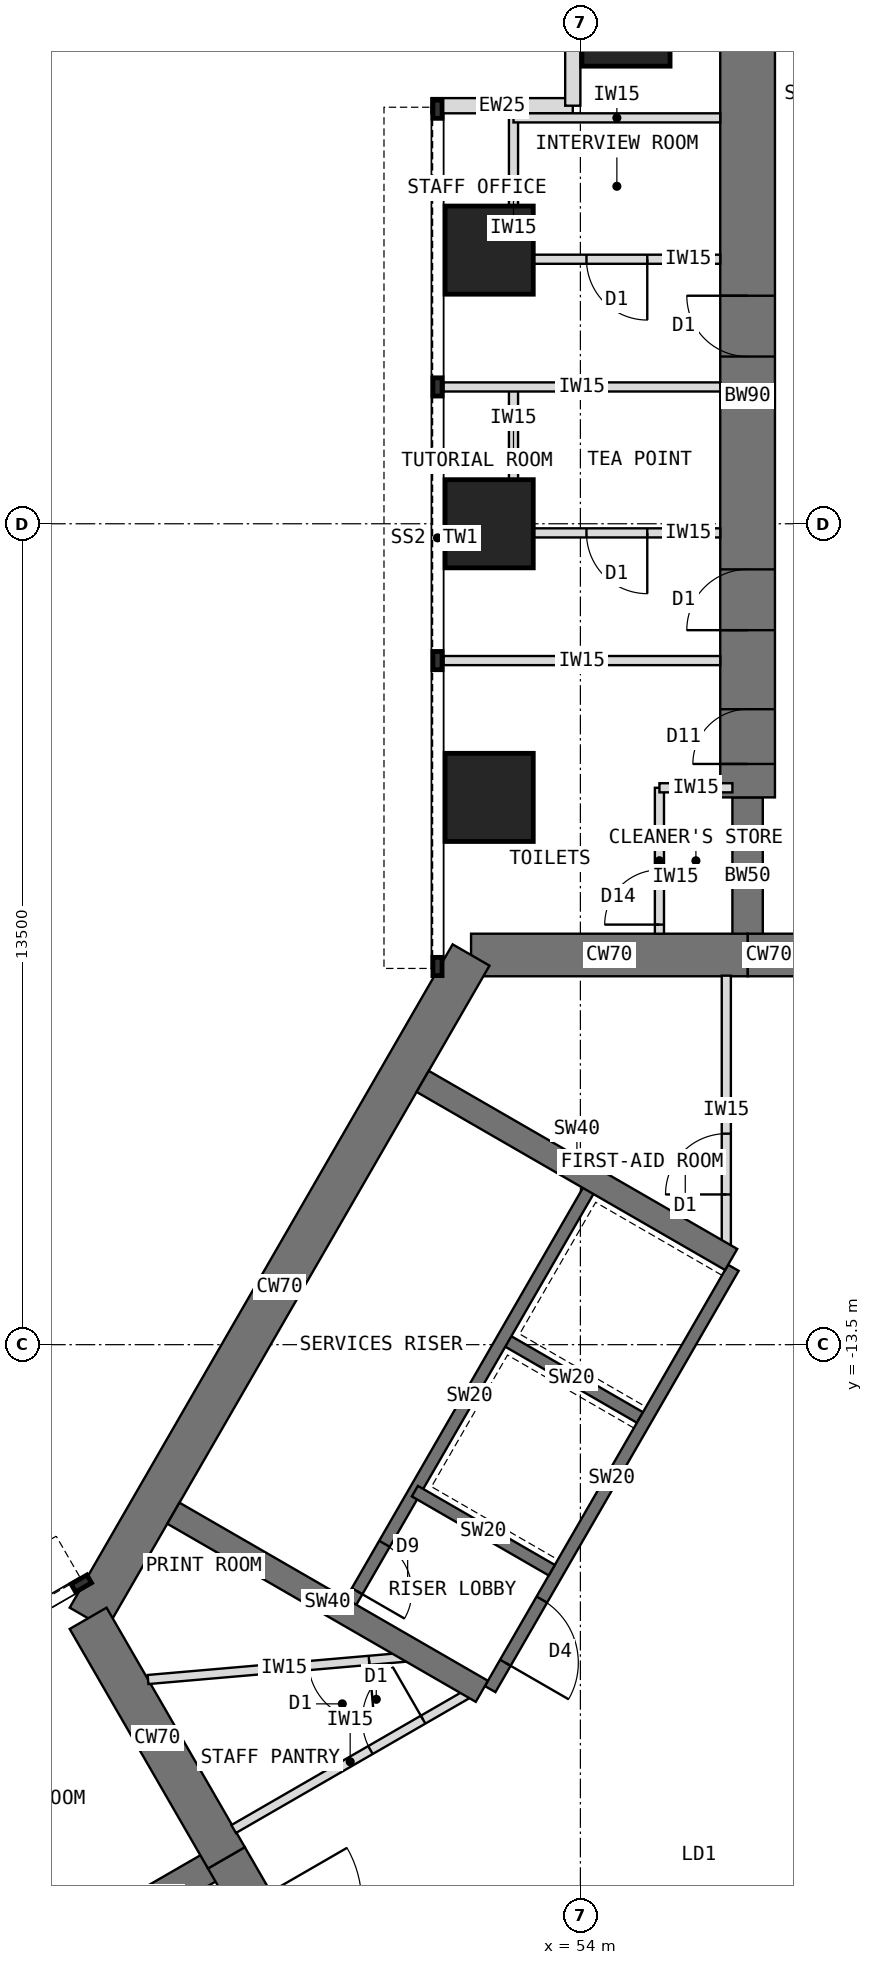
"""IFC4 building model, lengths in metres.
Left out: names, types, materials, properties, quantities, classifications, styles, units other than length and angle.
Written with IfcOpenShell. Run it as: python <this file> out.ifc"""

import sys

from ifc_helpers import new_model, si_unit, direction, frame, frame_2d, origin, origin_2d, place, context, subcontext, project, spatial, rectangle, extrude, element, fill, save


model = new_model("IFC4")
c1 = context("Model", 3, precision=1e-05, world=origin(), true_north=direction((0.0, 1.0)))
c2 = subcontext(c1, "Body", "Model", "MODEL_VIEW")
j1 = project(units=[si_unit("LENGTHUNIT", "METRE"), si_unit("PLANEANGLEUNIT", "RADIAN")], contexts=[c1])
p1 = place(None, origin())
s1 = spatial("IfcSite", under=j1, at=p1, CompositionType="ELEMENT")
p2 = place(p1, origin())
s2 = spatial("IfcBuilding", under=s1, at=p2, CompositionType="ELEMENT")
p3 = place(p2, frame((0.0, 0.0, 60.5)))
s3 = spatial("IfcBuildingStorey", under=s2, at=p3, CompositionType="ELEMENT", Elevation=60.5)
p4 = place(p3, frame((60.25, -7.092, 0.0), z_axis=(0.0, 0.0, 1.0), x_axis=(-1.0, 0.0, 0.0)))
e1 = element("IfcWall", 1, at=p4, inside=s3, PredefinedType="SHEAR", context=c2, shape_type="SweptSolid", body=[
    extrude(rectangle(XDim=3.5, YDim=0.7, at=frame_2d((1.75, 0.0))), origin(), (0.0, 0.0, 1.0), 4.0),
])
p5 = place(p4, frame((0.85, 0.0, 0.0)))
e2 = element("IfcOpeningElement", 2, at=p5, cuts=e1, PredefinedType="OPENING", context=c2, shape_type="SweptSolid", body=[
    extrude(rectangle(XDim=1.8, YDim=2.1, at=frame_2d((0.9, 1.05))), frame((0.0, 0.36, 0.0), z_axis=(0.0, -1.0, 0.0), x_axis=(1.0, 0.0, 0.0)), (0.0, 0.0, 1.0), 0.72),
])
p6 = place(p3, frame((56.75, -7.092, 0.0), z_axis=(0.0, 0.0, 1.0), x_axis=(-1.0, 0.0, 0.0)))
e3 = element("IfcWall", 3, at=p6, inside=s3, PredefinedType="SHEAR", context=c2, shape_type="SweptSolid", body=[
    extrude(rectangle(XDim=4.548, YDim=0.7, at=frame_2d((2.274, 0.0))), origin(), (0.0, 0.0, 1.0), 4.0),
])
p7 = place(p3, frame((52.202, -7.092, 0.0), z_axis=(0.0, 0.0, 1.0), x_axis=(-0.500005998175, -0.866021940709, 0.0)))
e4 = element("IfcWall", 4, at=p7, inside=s3, PredefinedType="SHEAR", context=c2, shape_type="SweptSolid", body=[
    extrude(rectangle(XDim=12.596, YDim=0.7, at=frame_2d((6.298, 0.0))), origin(), (0.0, 0.0, 1.0), 4.0),
])
p8 = place(p3, frame((45.904, -18.0, 0.0), z_axis=(0.0, 0.0, 1.0), x_axis=(0.500024481964, -0.866011268655, 0.0)))
e5 = element("IfcWall", 5, at=p8, inside=s3, PredefinedType="SHEAR", context=c2, shape_type="SweptSolid", body=[
    extrude(rectangle(XDim=4.548, YDim=0.7, at=frame_2d((2.274, 0.0))), origin(), (0.0, 0.0, 1.0), 4.0),
])
p9 = place(p3, frame((48.178, -21.939, 0.0), z_axis=(0.0, 0.0, 1.0), x_axis=(0.500010275428, -0.866019471182, 0.0)))
e6 = element("IfcWall", 6, at=p9, inside=s3, PredefinedType="SHEAR", context=c2, shape_type="SweptSolid", body=[
    extrude(rectangle(XDim=3.5, YDim=0.7, at=frame_2d((1.75, 0.0))), origin(), (0.0, 0.0, 1.0), 4.0),
])
p10 = place(p9, frame((0.85, 0.0, 0.0)))
e7 = element("IfcOpeningElement", 7, at=p10, cuts=e6, PredefinedType="OPENING", context=c2, shape_type="SweptSolid", body=[
    extrude(rectangle(XDim=1.8, YDim=2.1, at=frame_2d((0.9, 1.05))), frame((0.0, 0.36, 0.0), z_axis=(0.0, -1.0, 0.0), x_axis=(1.0, 0.0, 0.0)), (0.0, 0.0, 1.0), 0.72),
])
p11 = place(p3, frame((56.75, -7.092, 0.0), z_axis=(0.0, 0.0, 1.0), x_axis=(0.0, 1.0, 0.0)))
e8 = element("IfcWall", 8, at=p11, inside=s3, PredefinedType="SHEAR", context=c2, shape_type="SweptSolid", body=[
    extrude(rectangle(XDim=2.592, YDim=0.5, at=frame_2d((1.296, 0.0))), origin(), (0.0, 0.0, 1.0), 4.0),
])
p12 = place(p3, frame((56.75, -4.5, 0.0), z_axis=(0.0, 0.0, 1.0), x_axis=(0.0, 1.0, 0.0)))
e9 = element("IfcWall", 9, at=p12, inside=s3, PredefinedType="SHEAR", context=c2, shape_type="SweptSolid", body=[
    extrude(rectangle(XDim=13.2, YDim=0.9, at=frame_2d((6.6, 0.0))), origin(), (0.0, 0.0, 1.0), 4.0),
])
p13 = place(p12, frame((0.55, 0.0, 0.0)))
e10 = element("IfcOpeningElement", 10, at=p13, cuts=e9, PredefinedType="OPENING", context=c2, shape_type="SweptSolid", body=[
    extrude(rectangle(XDim=0.9, YDim=2.1, at=frame_2d((0.45, 1.05))), frame((0.0, 0.46, 0.0), z_axis=(0.0, -1.0, 0.0), x_axis=(1.0, 0.0, 0.0)), (0.0, 0.0, 1.0), 0.92),
])
p14 = place(p12, frame((2.75, 0.0, 0.0)))
e11 = element("IfcOpeningElement", 11, at=p14, cuts=e9, PredefinedType="OPENING", context=c2, shape_type="SweptSolid", body=[
    extrude(rectangle(XDim=1.0, YDim=2.1, at=frame_2d((0.5, 1.05))), frame((0.0, 0.46, 0.0), z_axis=(0.0, -1.0, 0.0), x_axis=(1.0, 0.0, 0.0)), (0.0, 0.0, 1.0), 0.92),
])
p15 = place(p12, frame((7.25, 0.0, 0.0)))
e12 = element("IfcOpeningElement", 12, at=p15, cuts=e9, PredefinedType="OPENING", context=c2, shape_type="SweptSolid", body=[
    extrude(rectangle(XDim=1.0, YDim=2.1, at=frame_2d((0.5, 1.05))), frame((0.0, 0.46, 0.0), z_axis=(0.0, -1.0, 0.0), x_axis=(1.0, 0.0, 0.0)), (0.0, 0.0, 1.0), 0.92),
])
p16 = place(p3, frame((48.178, -21.939, 0.0), z_axis=(0.0, 0.0, 1.0), x_axis=(-0.866072649678, -0.499918158782, 0.0)))
e13 = element("IfcWall", 13, at=p16, inside=s3, PredefinedType="SHEAR", context=c2, shape_type="SweptSolid", body=[
    extrude(rectangle(XDim=2.592, YDim=0.5, at=frame_2d((1.296, 0.0))), origin(), (0.0, 0.0, 1.0), 4.0),
])
for number, where, z_axis, x_axis in (
    (14, (52.5, -4.5, 0.0), (0.0, 0.0, 1.0), (1.0, 0.0, 0.0)),
    (15, (52.5, 0.0, 0.0), (0.0, 0.0, 1.0), (1.0, 0.0, 0.0)),
    (16, (52.5, 4.5, 0.0), (0.0, 0.0, 1.0), (1.0, 0.0, 0.0)),
    (17, (54.75, 8.25, 0.0), (0.0, 0.0, 1.0), (1.0, 0.0, 0.0)),
):
    element("IfcColumn", number, at=place(p3, frame(where, z_axis=z_axis, x_axis=x_axis)), inside=s3, PredefinedType="COLUMN", context=c2, shape_type="SweptSolid", body=[
        extrude(rectangle(XDim=1.45, YDim=1.45, at=origin_2d()), origin(), (0.0, 0.0, 1.0), 4.0),
    ])
for number, where, z_axis, x_axis in (
    (18, (51.55, 6.875, 0.0), (0.0, 0.0, 1.0), (1.0, 0.0, 0.0)),
    (19, (53.875, 6.875, 0.0), (0.0, 0.0, 1.0), (0.0, 1.0, 0.0)),
):
    element("IfcWall", number, at=place(p3, frame(where, z_axis=z_axis, x_axis=x_axis)), inside=s3, PredefinedType="STANDARD", context=c2, shape_type="SweptSolid", body=[
        extrude(rectangle(XDim=2.325, YDim=0.25, at=frame_2d((1.163, 0.0))), origin(), (0.0, 0.0, 1.0), 3.8),
    ])
p17 = place(p3, frame((56.516, -12.236, 0.0), z_axis=(0.0, 0.0, 1.0), x_axis=(-0.49999894854, -0.866026010844, 0.0)))
e20 = element("IfcWall", 20, at=p17, inside=s3, PredefinedType="SHEAR", context=c2, shape_type="SweptSolid", body=[
    extrude(rectangle(XDim=8.0, YDim=0.2, at=frame_2d((4.0, 0.0))), origin(), (0.0, 0.0, 1.0), 4.0),
])
p18 = place(p17, frame((6.3, 0.0, 0.0)))
e21 = element("IfcOpeningElement", 21, at=p18, cuts=e20, PredefinedType="OPENING", context=c2, shape_type="SweptSolid", body=[
    extrude(rectangle(XDim=1.2, YDim=2.1, at=frame_2d((0.6, 1.05))), frame((0.0, 0.11, 0.0), z_axis=(0.0, -1.0, 0.0), x_axis=(1.0, 0.0, 0.0)), (0.0, 0.0, 1.0), 0.22),
])
for number, where, z_axis, x_axis in (
    (22, (54.98, -14.697, 0.0), (0.0, 0.0, 1.0), (-0.866, 0.5, 0.0)),
    (23, (53.53, -17.209, 0.0), (0.0, 0.0, 1.0), (-0.866, 0.5, 0.0)),
):
    element("IfcWall", number, at=place(p3, frame(where, z_axis=z_axis, x_axis=x_axis)), inside=s3, PredefinedType="SHEAR", context=c2, shape_type="SweptSolid", body=[
        extrude(rectangle(XDim=2.6, YDim=0.2, at=frame_2d((1.3, 0.0))), origin(), (0.0, 0.0, 1.0), 4.0),
    ])
p19 = place(p3, frame((54.178, -10.886, 0.0), z_axis=(0.0, 0.0, 1.0), x_axis=(-0.49999894854, -0.866026010844, 0.0)))
e24 = element("IfcWall", 24, at=p19, inside=s3, PredefinedType="SHEAR", context=c2, shape_type="SweptSolid", body=[
    extrude(rectangle(XDim=8.0, YDim=0.2, at=frame_2d((4.0, 0.0))), origin(), (0.0, 0.0, 1.0), 4.0),
])
p20 = place(p19, frame((6.8, 0.0, 0.0)))
e25 = element("IfcOpeningElement", 25, at=p20, cuts=e24, PredefinedType="OPENING", context=c2, shape_type="SweptSolid", body=[
    extrude(rectangle(XDim=0.9, YDim=2.1, at=frame_2d((0.45, 1.05))), frame((0.0, 0.11, 0.0), z_axis=(0.0, -1.0, 0.0), x_axis=(1.0, 0.0, 0.0)), (0.0, 0.0, 1.0), 0.22),
])
for number, where, z_axis, x_axis in (
    (26, (52.38, -19.201, 0.0), (0.0, 0.0, 1.0), (-0.866, 0.5, 0.0)),
    (27, (56.48, -12.099, 0.0), (0.0, 0.0, 1.0), (-0.866, 0.5, 0.0)),
):
    element("IfcWall", number, at=place(p3, frame(where, z_axis=z_axis, x_axis=x_axis)), inside=s3, PredefinedType="SHEAR", context=c2, shape_type="SweptSolid", body=[
        extrude(rectangle(XDim=5.858, YDim=0.4, at=frame_2d((2.929, 0.0))), origin(), (0.0, 0.0, 1.0), 4.0),
    ])
for number, where, z_axis, x_axis in (
    (28, (56.3, -2.25, 0.0), (0.0, 0.0, 1.0), (-1.0, 0.0, 0.0)),
    (29, (56.3, 2.25, 0.0), (0.0, 0.0, 1.0), (-1.0, 0.0, 0.0)),
):
    element("IfcWall", number, at=place(p3, frame(where, z_axis=z_axis, x_axis=x_axis)), inside=s3, PredefinedType="PARTITIONING", context=c2, shape_type="SweptSolid", body=[
        extrude(rectangle(XDim=4.55, YDim=0.15, at=frame_2d((2.275, 0.0))), origin(), (0.0, 0.0, 1.0), 3.8),
    ])
p21 = place(p3, frame((52.9, -0.15, 0.0), z_axis=(0.0, 0.0, 1.0), x_axis=(0.0, 1.0, 0.0)))
e30 = element("IfcWall", 30, at=p21, inside=s3, PredefinedType="PARTITIONING", context=c2, shape_type="SweptSolid", body=[
    extrude(rectangle(XDim=2.4, YDim=0.15, at=frame_2d((1.2, 0.0))), origin(), (0.0, 0.0, 1.0), 3.8),
])
p22 = place(p3, frame((56.3, -0.15, 0.0), z_axis=(0.0, 0.0, 1.0), x_axis=(-1.0, 0.0, 0.0)))
e31 = element("IfcWall", 31, at=p22, inside=s3, PredefinedType="PARTITIONING", context=c2, shape_type="SweptSolid", body=[
    extrude(rectangle(XDim=3.4, YDim=0.15, at=frame_2d((1.7, 0.0))), origin(), (0.0, 0.0, 1.0), 3.8),
])
p23 = place(p22, frame((1.2, 0.0, 0.0)))
e32 = element("IfcOpeningElement", 32, at=p23, cuts=e31, PredefinedType="OPENING", context=c2, shape_type="SweptSolid", body=[
    extrude(rectangle(XDim=1.0, YDim=2.1, at=frame_2d((0.5, 1.05))), frame((0.0, 0.085, 0.0), z_axis=(0.0, -1.0, 0.0), x_axis=(1.0, 0.0, 0.0)), (0.0, 0.0, 1.0), 0.17),
])
p24 = place(p3, frame((52.9, 4.35, 0.0), z_axis=(0.0, 0.0, 1.0), x_axis=(0.0, 1.0, 0.0)))
e33 = element("IfcWall", 33, at=p24, inside=s3, PredefinedType="PARTITIONING", context=c2, shape_type="SweptSolid", body=[
    extrude(rectangle(XDim=2.4, YDim=0.15, at=frame_2d((1.2, 0.0))), origin(), (0.0, 0.0, 1.0), 3.8),
])
p25 = place(p3, frame((56.3, 4.35, 0.0), z_axis=(0.0, 0.0, 1.0), x_axis=(-1.0, 0.0, 0.0)))
e34 = element("IfcWall", 34, at=p25, inside=s3, PredefinedType="PARTITIONING", context=c2, shape_type="SweptSolid", body=[
    extrude(rectangle(XDim=3.4, YDim=0.15, at=frame_2d((1.7, 0.0))), origin(), (0.0, 0.0, 1.0), 3.8),
])
p26 = place(p25, frame((1.2, 0.0, 0.0)))
e35 = element("IfcOpeningElement", 35, at=p26, cuts=e34, PredefinedType="OPENING", context=c2, shape_type="SweptSolid", body=[
    extrude(rectangle(XDim=1.0, YDim=2.1, at=frame_2d((0.5, 1.05))), frame((0.0, 0.085, 0.0), z_axis=(0.0, -1.0, 0.0), x_axis=(1.0, 0.0, 0.0)), (0.0, 0.0, 1.0), 0.17),
])
p27 = place(p3, frame((56.3, 6.675, 0.0), z_axis=(0.0, 0.0, 1.0), x_axis=(-1.0, 0.0, 0.0)))
e36 = element("IfcWall", 36, at=p27, inside=s3, PredefinedType="PARTITIONING", context=c2, shape_type="SweptSolid", body=[
    extrude(rectangle(XDim=3.4, YDim=0.15, at=frame_2d((1.7, 0.0))), origin(), (0.0, 0.0, 1.0), 3.8),
])
p28 = place(p3, frame((55.3, -6.742, 0.0), z_axis=(0.0, 0.0, 1.0), x_axis=(0.0, 1.0, 0.0)))
e37 = element("IfcWall", 37, at=p28, inside=s3, PredefinedType="PARTITIONING", context=c2, shape_type="SweptSolid", body=[
    extrude(rectangle(XDim=2.4, YDim=0.15, at=frame_2d((1.2, 0.0))), origin(), (0.0, 0.0, 1.0), 3.8),
])
p29 = place(p28, frame((0.15, 0.0, 0.0)))
e38 = element("IfcOpeningElement", 38, at=p29, cuts=e37, PredefinedType="OPENING", context=c2, shape_type="SweptSolid", body=[
    extrude(rectangle(XDim=0.9, YDim=2.1, at=frame_2d((0.45, 1.05))), frame((0.0, 0.085, 0.0), z_axis=(0.0, -1.0, 0.0), x_axis=(1.0, 0.0, 0.0)), (0.0, 0.0, 1.0), 0.17),
])
p30 = place(p3, frame((56.5, -4.342, 0.0), z_axis=(0.0, 0.0, 1.0), x_axis=(-1.0, 0.0, 0.0)))
e39 = element("IfcWall", 39, at=p30, inside=s3, PredefinedType="PARTITIONING", context=c2, shape_type="SweptSolid", body=[
    extrude(rectangle(XDim=1.2, YDim=0.15, at=frame_2d((0.6, 0.0))), origin(), (0.0, 0.0, 1.0), 3.8),
])
p31 = place(p3, frame((48.298, -21.466, 0.0), z_axis=(0.0, 0.0, 1.0), x_axis=(0.866021148949, 0.500007369519, 0.0)))
e40 = element("IfcWall", 40, at=p31, inside=s3, PredefinedType="PARTITIONING", context=c2, shape_type="SweptSolid", body=[
    extrude(rectangle(XDim=4.426, YDim=0.15, at=frame_2d((2.213, 0.0))), origin(), (0.0, 0.0, 1.0), 3.8),
])
p32 = place(p31, frame((2.598, 0.0, 0.0)))
e41 = element("IfcOpeningElement", 41, at=p32, cuts=e40, PredefinedType="OPENING", context=c2, shape_type="SweptSolid", body=[
    extrude(rectangle(XDim=1.0, YDim=2.1, at=frame_2d((0.5, 1.05))), frame((0.0, 0.085, 0.0), z_axis=(0.0, -1.0, 0.0), x_axis=(1.0, 0.0, 0.0)), (0.0, 0.0, 1.0), 0.17),
])
p33 = place(p3, frame((56.4, -11.857, 0.0), z_axis=(0.0, 0.0, 1.0), x_axis=(0.0, 1.0, 0.0)))
e42 = element("IfcWall", 42, at=p33, inside=s3, PredefinedType="PARTITIONING", context=c2, shape_type="SweptSolid", body=[
    extrude(rectangle(XDim=4.426, YDim=0.15, at=frame_2d((2.213, 0.0))), origin(), (0.0, 0.0, 1.0), 3.8),
])
p34 = place(p33, frame((0.828, 0.0, 0.0)))
e43 = element("IfcOpeningElement", 43, at=p34, cuts=e42, PredefinedType="OPENING", context=c2, shape_type="SweptSolid", body=[
    extrude(rectangle(XDim=1.0, YDim=2.1, at=frame_2d((0.5, 1.05))), frame((0.0, 0.085, 0.0), z_axis=(0.0, -1.0, 0.0), x_axis=(1.0, 0.0, 0.0)), (0.0, 0.0, 1.0), 0.17),
])
p35 = place(p3, frame((51.371, -18.618, 0.0), z_axis=(0.0, 0.0, 1.0), x_axis=(-0.996259708579, -0.086409450071, 0.0)))
e44 = element("IfcWall", 44, at=p35, inside=s3, PredefinedType="PARTITIONING", context=c2, shape_type="SweptSolid", body=[
    extrude(rectangle(XDim=4.498, YDim=0.15, at=frame_2d((2.249, 0.0))), origin(), (0.0, 0.0, 1.0), 3.8),
])
p36 = place(p35, frame((0.849, 0.0, 0.0)))
e45 = element("IfcOpeningElement", 45, at=p36, cuts=e44, PredefinedType="OPENING", context=c2, shape_type="SweptSolid", body=[
    extrude(rectangle(XDim=1.0, YDim=2.1, at=frame_2d((0.5, 1.05))), frame((0.0, 0.085, 0.0), z_axis=(0.0, -1.0, 0.0), x_axis=(1.0, 0.0, 0.0)), (0.0, 0.0, 1.0), 0.17),
])
p37 = place(p18, origin())
e46 = element("IfcDoor", 46, at=p37, inside=s3, OperationType="SINGLE_SWING_RIGHT", PredefinedType="DOOR", context=c2, shape_type="SweptSolid", body=[
    extrude(rectangle(XDim=1.2, YDim=2.1, at=frame_2d((0.6, 1.05))), frame((0.0, 0.025, 0.0), z_axis=(0.0, -1.0, 0.0), x_axis=(1.0, 0.0, 0.0)), (0.0, 0.0, 1.0), 0.05),
])
fill(e21, e46)
p38 = place(p20, origin())
e47 = element("IfcDoor", 47, at=p38, inside=s3, OperationType="SINGLE_SWING_RIGHT", PredefinedType="DOOR", context=c2, shape_type="SweptSolid", body=[
    extrude(rectangle(XDim=0.9, YDim=2.1, at=frame_2d((0.45, 1.05))), frame((0.0, 0.025, 0.0), z_axis=(0.0, -1.0, 0.0), x_axis=(1.0, 0.0, 0.0)), (0.0, 0.0, 1.0), 0.05),
])
fill(e25, e47)
p39 = place(p23, origin())
e48 = element("IfcDoor", 48, at=p39, inside=s3, OperationType="SINGLE_SWING_LEFT", PredefinedType="DOOR", context=c2, shape_type="SweptSolid", body=[
    extrude(rectangle(XDim=1.0, YDim=2.1, at=frame_2d((0.5, 1.05))), frame((0.0, 0.025, 0.0), z_axis=(0.0, -1.0, 0.0), x_axis=(1.0, 0.0, 0.0)), (0.0, 0.0, 1.0), 0.05),
])
fill(e32, e48)
p40 = place(p26, origin())
e49 = element("IfcDoor", 49, at=p40, inside=s3, OperationType="SINGLE_SWING_LEFT", PredefinedType="DOOR", context=c2, shape_type="SweptSolid", body=[
    extrude(rectangle(XDim=1.0, YDim=2.1, at=frame_2d((0.5, 1.05))), frame((0.0, 0.025, 0.0), z_axis=(0.0, -1.0, 0.0), x_axis=(1.0, 0.0, 0.0)), (0.0, 0.0, 1.0), 0.05),
])
fill(e35, e49)
p41 = place(p29, origin())
e50 = element("IfcDoor", 50, at=p41, inside=s3, OperationType="SINGLE_SWING_LEFT", PredefinedType="DOOR", context=c2, shape_type="SweptSolid", body=[
    extrude(rectangle(XDim=0.9, YDim=2.1, at=frame_2d((0.45, 1.05))), frame((0.0, 0.025, 0.0), z_axis=(0.0, -1.0, 0.0), x_axis=(1.0, 0.0, 0.0)), (0.0, 0.0, 1.0), 0.05),
])
fill(e38, e50)
p42 = place(p36, origin())
e51 = element("IfcDoor", 51, at=p42, inside=s3, OperationType="SINGLE_SWING_LEFT", PredefinedType="DOOR", context=c2, shape_type="SweptSolid", body=[
    extrude(rectangle(XDim=1.0, YDim=2.1, at=frame_2d((0.5, 1.05))), frame((0.0, 0.025, 0.0), z_axis=(0.0, -1.0, 0.0), x_axis=(1.0, 0.0, 0.0)), (0.0, 0.0, 1.0), 0.05),
])
fill(e45, e51)
p43 = place(p32, origin())
e52 = element("IfcDoor", 52, at=p43, inside=s3, OperationType="SINGLE_SWING_RIGHT", PredefinedType="DOOR", context=c2, shape_type="SweptSolid", body=[
    extrude(rectangle(XDim=1.0, YDim=2.1, at=frame_2d((0.5, 1.05))), frame((0.0, 0.025, 0.0), z_axis=(0.0, -1.0, 0.0), x_axis=(1.0, 0.0, 0.0)), (0.0, 0.0, 1.0), 0.05),
])
fill(e41, e52)
p44 = place(p34, origin())
e53 = element("IfcDoor", 53, at=p44, inside=s3, OperationType="SINGLE_SWING_LEFT", PredefinedType="DOOR", context=c2, shape_type="SweptSolid", body=[
    extrude(rectangle(XDim=1.0, YDim=2.1, at=frame_2d((0.5, 1.05))), frame((0.0, 0.025, 0.0), z_axis=(0.0, -1.0, 0.0), x_axis=(1.0, 0.0, 0.0)), (0.0, 0.0, 1.0), 0.05),
])
fill(e43, e53)
p45 = place(p13, origin())
e54 = element("IfcDoor", 54, at=p45, inside=s3, OperationType="SINGLE_SWING_LEFT", PredefinedType="DOOR", context=c2, shape_type="SweptSolid", body=[
    extrude(rectangle(XDim=0.82, YDim=2.06, at=frame_2d((0.45, 1.03))), frame((0.0, 0.025, 0.0), z_axis=(0.0, -1.0, 0.0), x_axis=(1.0, 0.0, 0.0)), (0.0, 0.0, 1.0), 0.05),
    extrude(rectangle(XDim=0.04, YDim=2.1, at=frame_2d((0.02, 1.05))), frame((0.0, 0.45, 0.0), z_axis=(0.0, -1.0, 0.0), x_axis=(1.0, 0.0, 0.0)), (0.0, 0.0, 1.0), 0.899),
    extrude(rectangle(XDim=0.04, YDim=2.1, at=frame_2d((0.88, 1.05))), frame((0.0, 0.45, 0.0), z_axis=(0.0, -1.0, 0.0), x_axis=(1.0, 0.0, 0.0)), (0.0, 0.0, 1.0), 0.899),
    extrude(rectangle(XDim=0.82, YDim=0.04, at=frame_2d((0.45, 2.08))), frame((0.0, 0.45, 0.0), z_axis=(0.0, -1.0, 0.0), x_axis=(1.0, 0.0, 0.0)), (0.0, 0.0, 1.0), 0.899),
])
fill(e10, e54)
p46 = place(p14, origin())
e55 = element("IfcDoor", 55, at=p46, inside=s3, OperationType="SINGLE_SWING_LEFT", PredefinedType="DOOR", context=c2, shape_type="SweptSolid", body=[
    extrude(rectangle(XDim=0.92, YDim=2.06, at=frame_2d((0.5, 1.03))), frame((0.0, 0.025, 0.0), z_axis=(0.0, -1.0, 0.0), x_axis=(1.0, 0.0, 0.0)), (0.0, 0.0, 1.0), 0.05),
    extrude(rectangle(XDim=0.04, YDim=2.1, at=frame_2d((0.02, 1.05))), frame((0.0, 0.45, 0.0), z_axis=(0.0, -1.0, 0.0), x_axis=(1.0, 0.0, 0.0)), (0.0, 0.0, 1.0), 0.899),
    extrude(rectangle(XDim=0.04, YDim=2.1, at=frame_2d((0.98, 1.05))), frame((0.0, 0.45, 0.0), z_axis=(0.0, -1.0, 0.0), x_axis=(1.0, 0.0, 0.0)), (0.0, 0.0, 1.0), 0.899),
    extrude(rectangle(XDim=0.92, YDim=0.04, at=frame_2d((0.5, 2.08))), frame((0.0, 0.45, 0.0), z_axis=(0.0, -1.0, 0.0), x_axis=(1.0, 0.0, 0.0)), (0.0, 0.0, 1.0), 0.899),
])
fill(e11, e55)
p47 = place(p15, origin())
e56 = element("IfcDoor", 56, at=p47, inside=s3, OperationType="SINGLE_SWING_RIGHT", PredefinedType="DOOR", context=c2, shape_type="SweptSolid", body=[
    extrude(rectangle(XDim=0.92, YDim=2.06, at=frame_2d((0.5, 1.03))), frame((0.0, 0.025, 0.0), z_axis=(0.0, -1.0, 0.0), x_axis=(1.0, 0.0, 0.0)), (0.0, 0.0, 1.0), 0.05),
    extrude(rectangle(XDim=0.04, YDim=2.1, at=frame_2d((0.02, 1.05))), frame((0.0, 0.45, 0.0), z_axis=(0.0, -1.0, 0.0), x_axis=(1.0, 0.0, 0.0)), (0.0, 0.0, 1.0), 0.899),
    extrude(rectangle(XDim=0.04, YDim=2.1, at=frame_2d((0.98, 1.05))), frame((0.0, 0.45, 0.0), z_axis=(0.0, -1.0, 0.0), x_axis=(1.0, 0.0, 0.0)), (0.0, 0.0, 1.0), 0.899),
    extrude(rectangle(XDim=0.92, YDim=0.04, at=frame_2d((0.5, 2.08))), frame((0.0, 0.45, 0.0), z_axis=(0.0, -1.0, 0.0), x_axis=(1.0, 0.0, 0.0)), (0.0, 0.0, 1.0), 0.899),
])
fill(e12, e56)
save(model, sys.argv[1])
